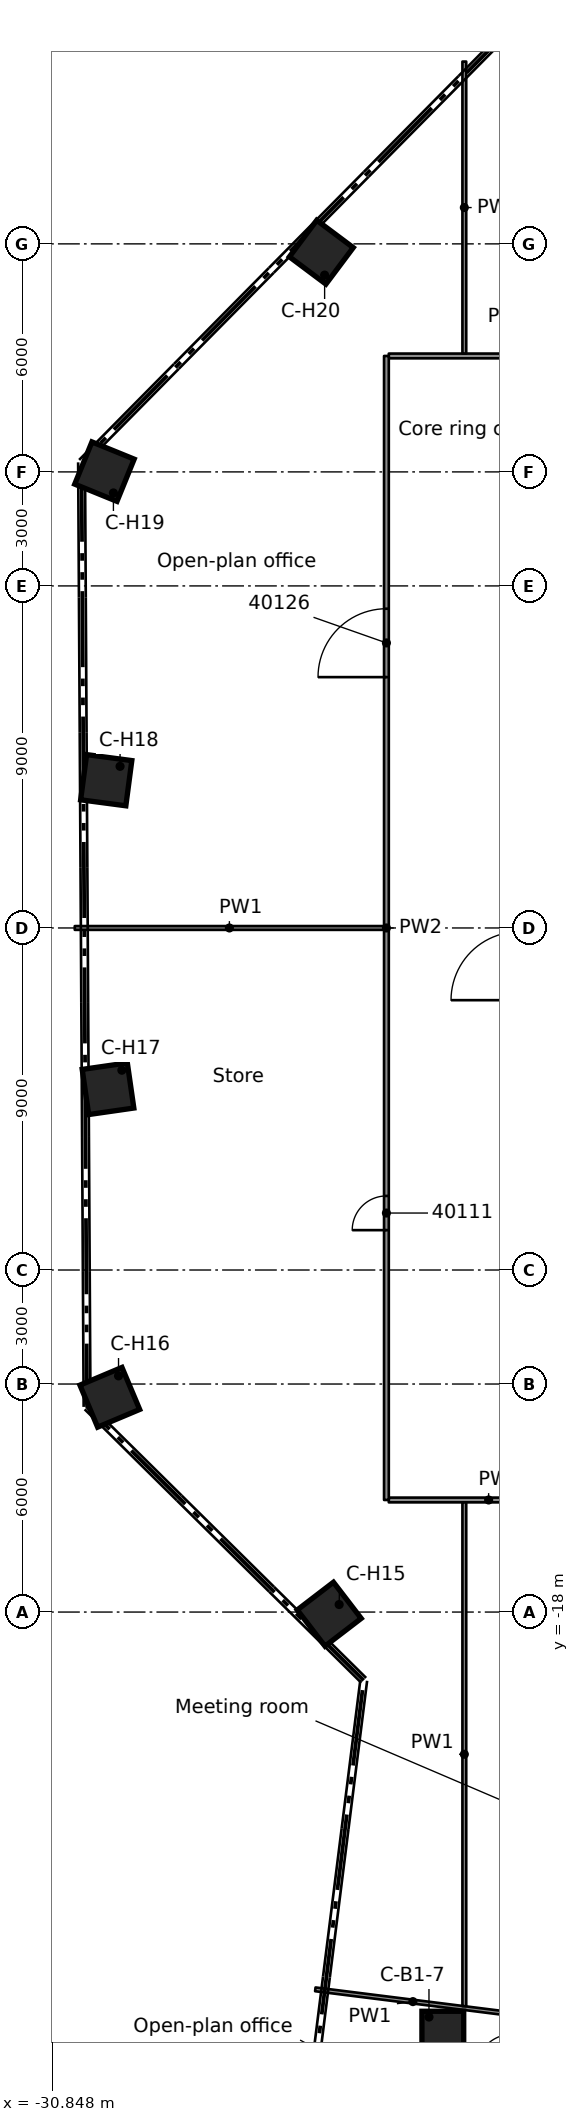
"""IFC4 building model, lengths in metres.
Left out: names, types, materials, properties, quantities, classifications, styles, units other than length and angle.
Written with IfcOpenShell. Run it as: python <this file> out.ifc"""

import sys

from ifc_helpers import new_model, si_unit, direction, frame, frame_2d, origin, origin_2d, place, context, subcontext, project, spatial, rectangle, extrude, element, fill, save


model = new_model("IFC4")
c1 = context("Model", 3, precision=1e-05, world=origin(), true_north=direction((0.0, 1.0)))
c2 = subcontext(c1, "Body", "Model", "MODEL_VIEW")
j1 = project(units=[si_unit("LENGTHUNIT", "METRE"), si_unit("PLANEANGLEUNIT", "RADIAN")], contexts=[c1])
p1 = place(None, origin())
s1 = spatial("IfcSite", under=j1, at=p1, CompositionType="ELEMENT")
p2 = place(p1, origin())
s2 = spatial("IfcBuilding", under=s1, at=p2, CompositionType="ELEMENT")
p3 = place(p2, frame((0.0, 0.0, 199.1)))
s3 = spatial("IfcBuildingStorey", under=s2, at=p3, CompositionType="ELEMENT", Elevation=199.1)
p4 = place(p3, frame((-20.566, -28.954, 0.0), z_axis=(0.0, 0.0, 1.0), x_axis=(1.0, 0.0, 0.0)))
e1 = element("IfcColumn", 1, at=p4, inside=s3, PredefinedType="COLUMN", context=c2, shape_type="SweptSolid", body=[
    extrude(rectangle(XDim=1.1, YDim=0.9, at=origin_2d()), origin(), (0.0, 0.0, 1.0), 3.5),
])
for number, where, z_axis, x_axis in (
    (2, (-23.555, -18.056, 0.0), (0.0, 0.0, 1.0), (-0.794, -0.608, 0.0)),
    (3, (-29.329, -12.349, 0.0), (0.0, 0.0, 1.0), (-0.922, -0.388, 0.0)),
    (4, (-29.376, -4.23, 0.0), (0.0, 0.0, 1.0), (-0.99, -0.143, 0.0)),
    (5, (-29.423, 3.888, 0.0), (0.0, 0.0, 1.0), (-0.991, 0.131, 0.0)),
    (6, (-29.47, 12.007, 0.0), (0.0, 0.0, 1.0), (-0.926, 0.377, 0.0)),
    (7, (-23.763, 17.781, 0.0), (0.0, 0.0, 1.0), (-0.801, 0.599, 0.0)),
):
    element("IfcColumn", number, at=place(p3, frame(where, z_axis=z_axis, x_axis=x_axis)), inside=s3, PredefinedType="COLUMN", context=c2, shape_type="SweptSolid", body=[
        extrude(rectangle(XDim=1.2, YDim=1.2, at=origin_2d()), origin(), (0.0, 0.0, 1.0), 3.5),
    ])
p5 = place(p3, frame((-23.921, -27.927, 0.0), z_axis=(0.0, 0.0, 1.0), x_axis=(0.992179593467, -0.124818485443, 0.0)))
e8 = element("IfcWall", 8, at=p5, inside=s3, PredefinedType="PARTITIONING", context=c2, shape_type="SweptSolid", body=[
    extrude(rectangle(XDim=5.176, YDim=0.1, at=frame_2d((2.588, 0.0))), origin(), (0.0, 0.0, 1.0), 3.03),
])
p6 = place(p3, frame((-21.988, -15.051, 0.0), z_axis=(0.0, 0.0, 1.0), x_axis=(1.0, 0.0, 0.0)))
e9 = element("IfcWall", 9, at=p6, inside=s3, PredefinedType="PARTITIONING", context=c2, shape_type="SweptSolid", body=[
    extrude(rectangle(XDim=5.255, YDim=0.125, at=frame_2d((2.627, 0.0))), origin(), (0.0, 0.0, 1.0), 3.03),
])
p7 = place(p3, frame((-30.251, 0.0, 0.0), z_axis=(0.0, 0.0, 1.0), x_axis=(1.0, 0.0, 0.0)))
e10 = element("IfcWall", 10, at=p7, inside=s3, PredefinedType="PARTITIONING", context=c2, shape_type="SweptSolid", body=[
    extrude(rectangle(XDim=8.138, YDim=0.1, at=frame_2d((4.069, 0.0))), origin(), (0.0, 0.0, 1.0), 3.03),
])
p8 = place(p3, frame((-21.988, 15.051, 0.0), z_axis=(0.0, 0.0, 1.0), x_axis=(1.0, 0.0, 0.0)))
e11 = element("IfcWall", 11, at=p8, inside=s3, PredefinedType="PARTITIONING", context=c2, shape_type="SweptSolid", body=[
    extrude(rectangle(XDim=10.997, YDim=0.125, at=frame_2d((5.499, 0.0))), origin(), (0.0, 0.0, 1.0), 3.03),
])
p9 = place(p8, frame((5.587, 0.0, 0.0)))
e12 = element("IfcOpeningElement", 12, at=p9, cuts=e11, PredefinedType="OPENING", context=c2, shape_type="SweptSolid", body=[
    extrude(rectangle(XDim=1.8, YDim=2.1, at=frame_2d((0.9, 1.05))), frame((0.0, 0.073, 0.0), z_axis=(0.0, -1.0, 0.0), x_axis=(1.0, 0.0, 0.0)), (0.0, 0.0, 1.0), 0.145),
])
p10 = place(p3, frame((-20.0, -28.37, 0.0), z_axis=(0.0, 0.0, 1.0), x_axis=(0.0, 1.0, 0.0)))
e13 = element("IfcWall", 13, at=p10, inside=s3, PredefinedType="PARTITIONING", context=c2, shape_type="SweptSolid", body=[
    extrude(rectangle(XDim=13.256, YDim=0.1, at=frame_2d((6.628, 0.0))), origin(), (0.0, 0.0, 1.0), 3.03),
])
p11 = place(p3, frame((-20.0, 15.114, 0.0), z_axis=(0.0, 0.0, 1.0), x_axis=(0.0, 1.0, 0.0)))
e14 = element("IfcWall", 14, at=p11, inside=s3, PredefinedType="PARTITIONING", context=c2, shape_type="SweptSolid", body=[
    extrude(rectangle(XDim=7.683, YDim=0.1, at=frame_2d((3.842, 0.0))), origin(), (0.0, 0.0, 1.0), 2.395),
])
p12 = place(p3, frame((-22.05, -15.051, 0.0), z_axis=(0.0, 0.0, 1.0), x_axis=(0.0, 1.0, 0.0)))
e15 = element("IfcWall", 15, at=p12, inside=s3, PredefinedType="PARTITIONING", context=c2, shape_type="SweptSolid", body=[
    extrude(rectangle(XDim=30.102, YDim=0.125, at=frame_2d((15.051, 0.0))), origin(), (0.0, 0.0, 1.0), 3.03),
])
p13 = place(p12, frame((7.1, 0.0, 0.0)))
e16 = element("IfcOpeningElement", 16, at=p13, cuts=e15, PredefinedType="OPENING", context=c2, shape_type="SweptSolid", body=[
    extrude(rectangle(XDim=0.9, YDim=2.1, at=frame_2d((0.45, 1.05))), frame((0.0, 0.073, 0.0), z_axis=(0.0, -1.0, 0.0), x_axis=(1.0, 0.0, 0.0)), (0.0, 0.0, 1.0), 0.145),
])
p14 = place(p12, frame((21.651, 0.0, 0.0)))
e17 = element("IfcOpeningElement", 17, at=p14, cuts=e15, PredefinedType="OPENING", context=c2, shape_type="SweptSolid", body=[
    extrude(rectangle(XDim=1.8, YDim=2.1, at=frame_2d((0.9, 1.05))), frame((0.0, 0.073, 0.0), z_axis=(0.0, -1.0, 0.0), x_axis=(1.0, 0.0, 0.0)), (0.0, 0.0, 1.0), 0.145),
])
p15 = place(p13, origin())
e18 = element("IfcDoor", 18, at=p15, inside=s3, OperationType="SINGLE_SWING_LEFT", PredefinedType="DOOR", context=c2, shape_type="SweptSolid", body=[
    extrude(rectangle(XDim=0.9, YDim=2.1, at=frame_2d((0.45, 1.05))), frame((0.0, 0.025, 0.0), z_axis=(0.0, -1.0, 0.0), x_axis=(1.0, 0.0, 0.0)), (0.0, 0.0, 1.0), 0.05),
])
fill(e16, e18)
p16 = place(p14, origin())
e19 = element("IfcDoor", 19, at=p16, inside=s3, OperationType="DOUBLE_DOOR_SINGLE_SWING", PredefinedType="DOOR", context=c2, shape_type="SweptSolid", body=[
    extrude(rectangle(XDim=1.8, YDim=2.1, at=frame_2d((0.9, 1.05))), frame((0.0, 0.025, 0.0), z_axis=(0.0, -1.0, 0.0), x_axis=(1.0, 0.0, 0.0)), (0.0, 0.0, 1.0), 0.05),
])
fill(e17, e19)
save(model, sys.argv[1])
